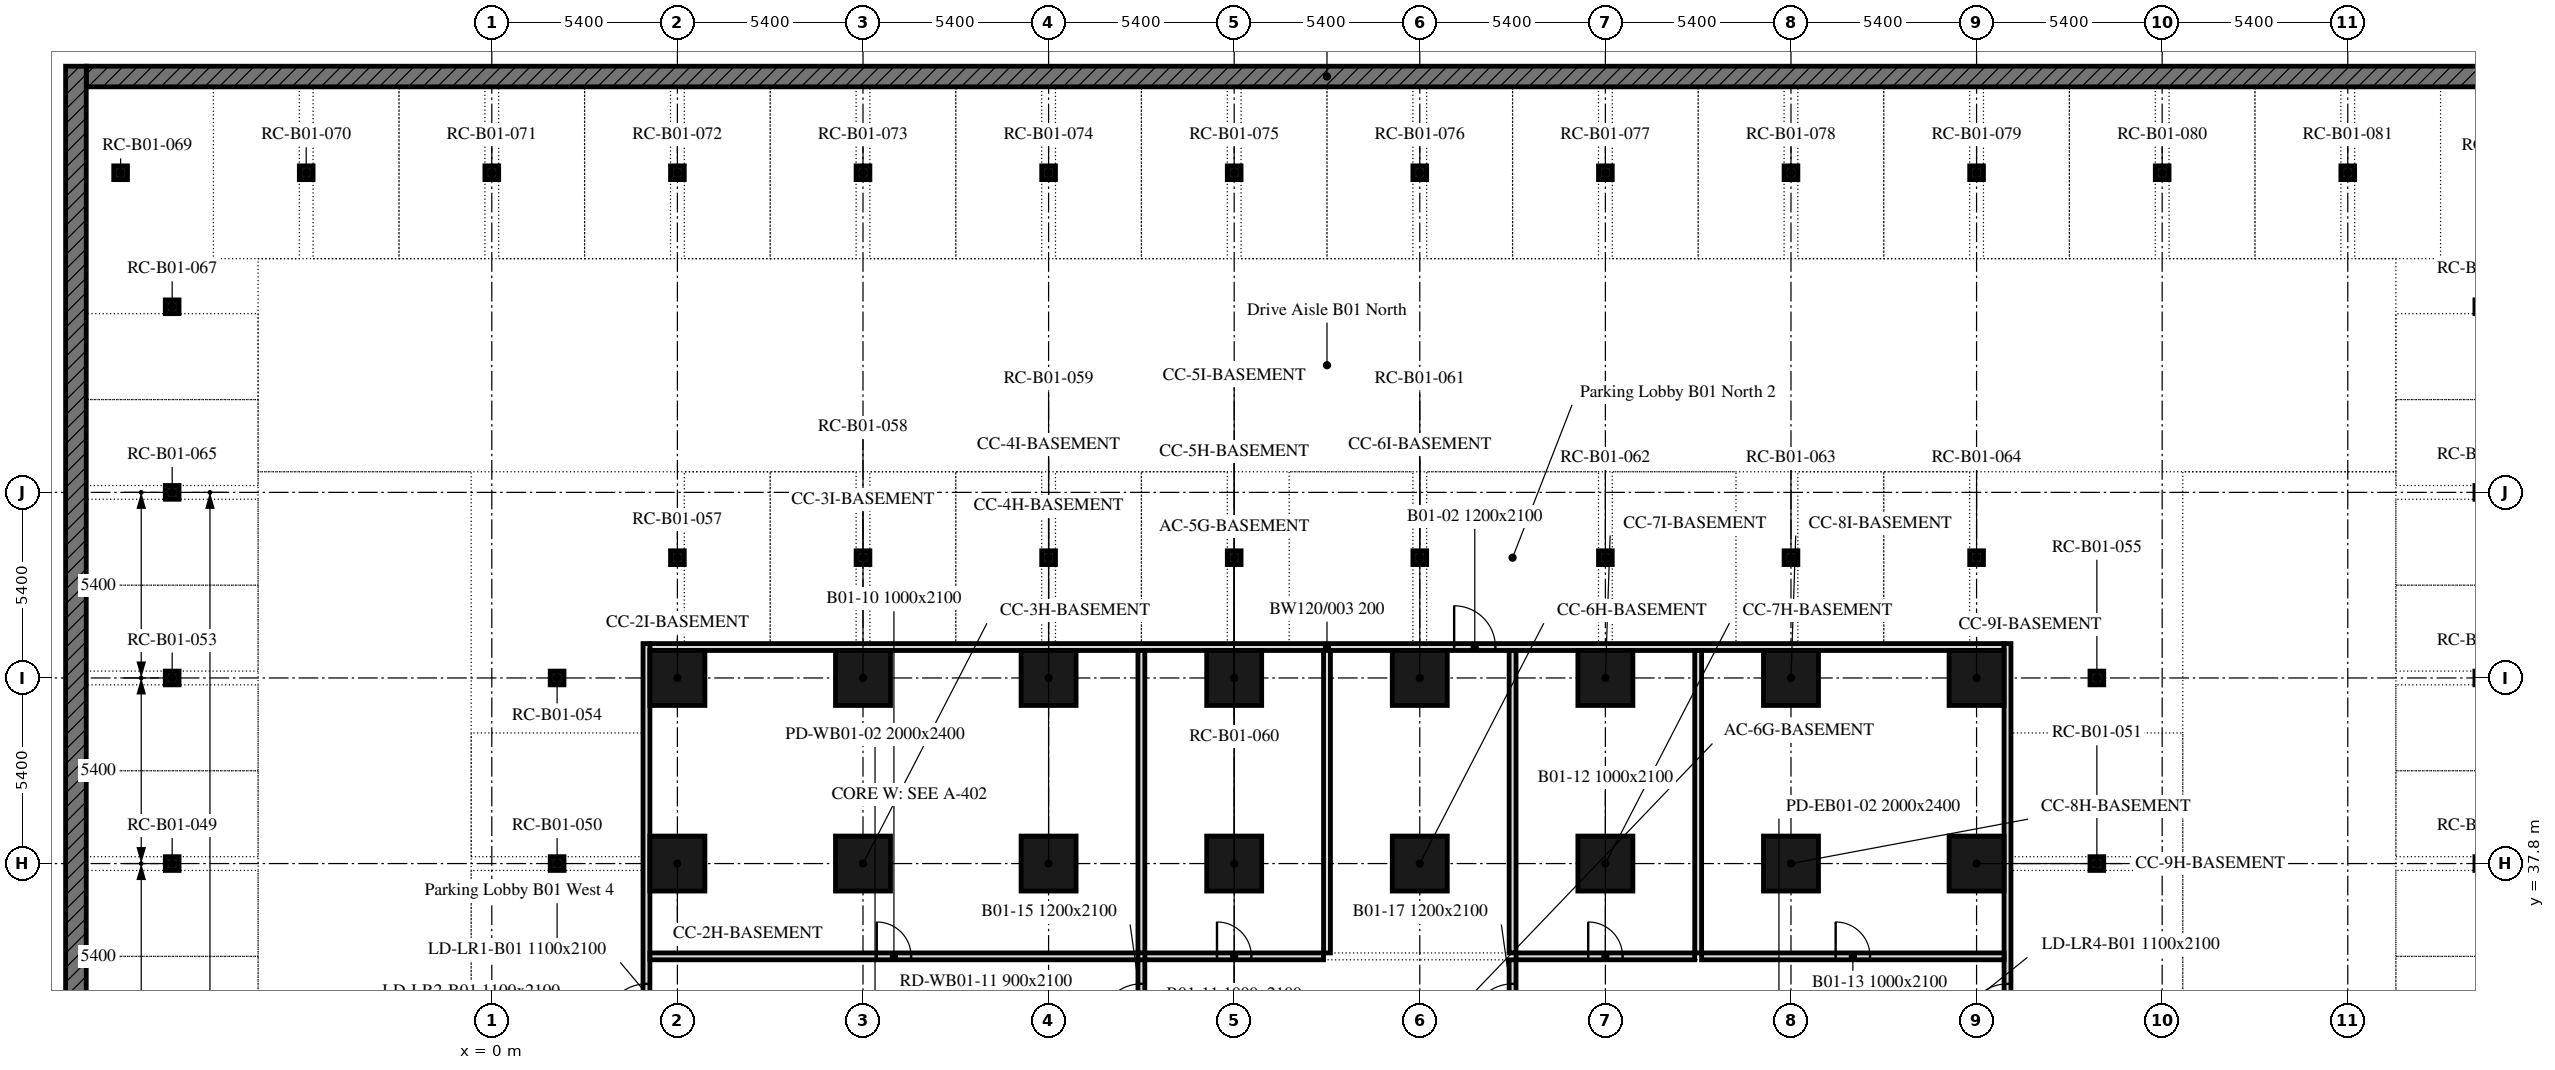
"""IFC4 building model, lengths in metres.
Left out: names, types, materials, properties, quantities, classifications, styles, units other than length and angle.
Written with IfcOpenShell. Run it as: python <this file> out.ifc"""

import sys

from ifc_helpers import new_model, si_unit, direction, frame, frame_2d, origin, origin_2d, place, context, subcontext, project, spatial, rectangle, extrude, element, fill, save


model = new_model("IFC4")
c1 = context("Model", 3, precision=1e-05, world=origin(), true_north=direction((0.0, 1.0)))
c2 = subcontext(c1, "Body", "Model", "MODEL_VIEW")
j1 = project(units=[si_unit("LENGTHUNIT", "METRE"), si_unit("PLANEANGLEUNIT", "RADIAN")], contexts=[c1])
p1 = place(None, origin())
s1 = spatial("IfcSite", under=j1, at=p1, CompositionType="ELEMENT")
p2 = place(p1, origin())
s2 = spatial("IfcBuilding", under=s1, at=p2, CompositionType="ELEMENT")
p3 = place(p2, frame((0.0, 0.0, -4.5)))
s3 = spatial("IfcBuildingStorey", under=s2, at=p3, CompositionType="ELEMENT", Elevation=-4.5)
p4 = place(p3, frame((-12.1, -12.4, 0.0), z_axis=(0.0, 0.0, 1.0), x_axis=(0.0, 1.0, 0.0)))
e1 = element("IfcWall", 1, at=p4, inside=s3, PredefinedType="SOLIDWALL", context=c2, shape_type="SweptSolid", body=[
    extrude(rectangle(XDim=73.4, YDim=0.6, at=frame_2d((36.7, 0.0))), origin(), (0.0, 0.0, 1.0), 4.0),
])
p5 = place(p3, frame((-11.8, 60.7, 0.0), z_axis=(0.0, 0.0, 1.0), x_axis=(1.0, 0.0, 0.0)))
e2 = element("IfcWall", 2, at=p5, inside=s3, PredefinedType="SOLIDWALL", context=c2, shape_type="SweptSolid", body=[
    extrude(rectangle(XDim=72.2, YDim=0.6, at=frame_2d((36.1, 0.0))), origin(), (0.0, 0.0, 1.0), 4.0),
])
for number, where, z_axis, x_axis in (
    (3, (5.4, 37.8, 0.0), (0.0, 0.0, 1.0), (1.0, 0.0, 0.0)),
    (4, (10.8, 37.8, 0.0), (0.0, 0.0, 1.0), (1.0, 0.0, 0.0)),
    (5, (16.2, 37.8, 0.0), (0.0, 0.0, 1.0), (1.0, 0.0, 0.0)),
    (6, (21.6, 37.8, 0.0), (0.0, 0.0, 1.0), (1.0, 0.0, 0.0)),
    (7, (27.0, 37.8, 0.0), (0.0, 0.0, 1.0), (1.0, 0.0, 0.0)),
    (8, (32.4, 37.8, 0.0), (0.0, 0.0, 1.0), (1.0, 0.0, 0.0)),
    (9, (37.8, 37.8, 0.0), (0.0, 0.0, 1.0), (1.0, 0.0, 0.0)),
    (10, (43.2, 37.8, 0.0), (0.0, 0.0, 1.0), (1.0, 0.0, 0.0)),
    (11, (5.4, 43.2, 0.0), (0.0, 0.0, 1.0), (1.0, 0.0, 0.0)),
    (12, (10.8, 43.2, 0.0), (0.0, 0.0, 1.0), (1.0, 0.0, 0.0)),
    (13, (16.2, 43.2, 0.0), (0.0, 0.0, 1.0), (1.0, 0.0, 0.0)),
    (14, (21.6, 43.2, 0.0), (0.0, 0.0, 1.0), (1.0, 0.0, 0.0)),
    (15, (27.0, 43.2, 0.0), (0.0, 0.0, 1.0), (1.0, 0.0, 0.0)),
    (16, (32.4, 43.2, 0.0), (0.0, 0.0, 1.0), (1.0, 0.0, 0.0)),
    (17, (37.8, 43.2, 0.0), (0.0, 0.0, 1.0), (1.0, 0.0, 0.0)),
    (18, (43.2, 43.2, 0.0), (0.0, 0.0, 1.0), (1.0, 0.0, 0.0)),
):
    element("IfcColumn", number, at=place(p3, frame(where, z_axis=z_axis, x_axis=x_axis)), inside=s3, PredefinedType="COLUMN", context=c2, shape_type="SweptSolid", body=[
        extrude(rectangle(XDim=1.6, YDim=1.6, at=origin_2d()), origin(), (0.0, 0.0, 1.0), 4.0),
    ])
for number, where, z_axis, x_axis in (
    (19, (-9.3, 37.8, 0.0), (0.0, 0.0, 1.0), (1.0, 0.0, 0.0)),
    (20, (1.9, 37.8, 0.0), (0.0, 0.0, 1.0), (1.0, 0.0, 0.0)),
    (21, (46.7, 37.8, 0.0), (0.0, 0.0, 1.0), (1.0, 0.0, 0.0)),
    (22, (-9.3, 43.2, 0.0), (0.0, 0.0, 1.0), (1.0, 0.0, 0.0)),
    (23, (1.9, 43.2, 0.0), (0.0, 0.0, 1.0), (1.0, 0.0, 0.0)),
    (24, (46.7, 43.2, 0.0), (0.0, 0.0, 1.0), (1.0, 0.0, 0.0)),
    (25, (5.4, 46.7, 0.0), (0.0, 0.0, 1.0), (1.0, 0.0, 0.0)),
    (26, (10.8, 46.7, 0.0), (0.0, 0.0, 1.0), (1.0, 0.0, 0.0)),
    (27, (16.2, 46.7, 0.0), (0.0, 0.0, 1.0), (1.0, 0.0, 0.0)),
    (28, (21.6, 46.7, 0.0), (0.0, 0.0, 1.0), (1.0, 0.0, 0.0)),
    (29, (27.0, 46.7, 0.0), (0.0, 0.0, 1.0), (1.0, 0.0, 0.0)),
    (30, (32.4, 46.7, 0.0), (0.0, 0.0, 1.0), (1.0, 0.0, 0.0)),
    (31, (37.8, 46.7, 0.0), (0.0, 0.0, 1.0), (1.0, 0.0, 0.0)),
    (32, (43.2, 46.7, 0.0), (0.0, 0.0, 1.0), (1.0, 0.0, 0.0)),
    (33, (-9.3, 48.6, 0.0), (0.0, 0.0, 1.0), (1.0, 0.0, 0.0)),
    (34, (-9.3, 54.0, 0.0), (0.0, 0.0, 1.0), (1.0, 0.0, 0.0)),
    (35, (-10.8, 57.9, 0.0), (0.0, 0.0, 1.0), (1.0, 0.0, 0.0)),
    (36, (-5.4, 57.9, 0.0), (0.0, 0.0, 1.0), (1.0, 0.0, 0.0)),
    (37, (0.0, 57.9, 0.0), (0.0, 0.0, 1.0), (1.0, 0.0, 0.0)),
    (38, (5.4, 57.9, 0.0), (0.0, 0.0, 1.0), (1.0, 0.0, 0.0)),
    (39, (10.8, 57.9, 0.0), (0.0, 0.0, 1.0), (1.0, 0.0, 0.0)),
    (40, (16.2, 57.9, 0.0), (0.0, 0.0, 1.0), (1.0, 0.0, 0.0)),
    (41, (21.6, 57.9, 0.0), (0.0, 0.0, 1.0), (1.0, 0.0, 0.0)),
    (42, (27.0, 57.9, 0.0), (0.0, 0.0, 1.0), (1.0, 0.0, 0.0)),
    (43, (32.4, 57.9, 0.0), (0.0, 0.0, 1.0), (1.0, 0.0, 0.0)),
    (44, (37.8, 57.9, 0.0), (0.0, 0.0, 1.0), (1.0, 0.0, 0.0)),
    (45, (43.2, 57.9, 0.0), (0.0, 0.0, 1.0), (1.0, 0.0, 0.0)),
    (46, (48.6, 57.9, 0.0), (0.0, 0.0, 1.0), (1.0, 0.0, 0.0)),
    (47, (54.0, 57.9, 0.0), (0.0, 0.0, 1.0), (1.0, 0.0, 0.0)),
):
    element("IfcColumn", number, at=place(p3, frame(where, z_axis=z_axis, x_axis=x_axis)), inside=s3, PredefinedType="COLUMN", context=c2, shape_type="SweptSolid", body=[
        extrude(rectangle(XDim=0.4, YDim=0.4, at=origin_2d()), origin(), (0.0, 0.0, 1.0), 4.0),
    ])
p6 = place(p3, frame((4.6, 44.1, 0.0), z_axis=(0.0, 0.0, 1.0), x_axis=(1.0, 0.0, 0.0)))
e48 = element("IfcWall", 48, at=p6, inside=s3, PredefinedType="PARTITIONING", context=c2, shape_type="SweptSolid", body=[
    extrude(rectangle(XDim=39.4, YDim=0.2, at=frame_2d((19.7, 0.0))), origin(), (0.0, 0.0, 1.0), 4.0),
])
p7 = place(p6, frame((23.4, 0.0, 0.0)))
e49 = element("IfcOpeningElement", 49, at=p7, cuts=e48, PredefinedType="OPENING", context=c2, shape_type="SweptSolid", body=[
    extrude(rectangle(XDim=1.2, YDim=2.1, at=frame_2d((0.6, 1.05))), frame((0.0, 0.11, 0.0), z_axis=(0.0, -1.0, 0.0), x_axis=(1.0, 0.0, 0.0)), (0.0, 0.0, 1.0), 0.22),
])
p8 = place(p3, frame((4.5, 4.4, 0.0), z_axis=(0.0, 0.0, 1.0), x_axis=(0.0, 1.0, 0.0)))
e50 = element("IfcWall", 50, at=p8, inside=s3, PredefinedType="PARTITIONING", context=c2, shape_type="SweptSolid", body=[
    extrude(rectangle(XDim=39.8, YDim=0.2, at=frame_2d((19.9, 0.0))), origin(), (0.0, 0.0, 1.0), 4.0),
])
p9 = place(p8, frame((9.9, 0.0, 0.0)))
e51 = element("IfcOpeningElement", 51, at=p9, cuts=e50, PredefinedType="OPENING", context=c2, shape_type="SweptSolid", body=[
    extrude(rectangle(XDim=1.2, YDim=2.1, at=frame_2d((0.6, 1.05))), frame((0.0, 0.11, 0.0), z_axis=(0.0, -1.0, 0.0), x_axis=(1.0, 0.0, 0.0)), (0.0, 0.0, 1.0), 0.22),
])
p10 = place(p8, frame((28.7, 0.0, 0.0)))
e52 = element("IfcOpeningElement", 52, at=p10, cuts=e50, PredefinedType="OPENING", context=c2, shape_type="SweptSolid", body=[
    extrude(rectangle(XDim=1.2, YDim=2.1, at=frame_2d((0.6, 1.05))), frame((0.0, 0.11, 0.0), z_axis=(0.0, -1.0, 0.0), x_axis=(1.0, 0.0, 0.0)), (0.0, 0.0, 1.0), 0.22),
])
p11 = place(p3, frame((44.1, 4.4, 0.0), z_axis=(0.0, 0.0, 1.0), x_axis=(0.0, 1.0, 0.0)))
e53 = element("IfcWall", 53, at=p11, inside=s3, PredefinedType="PARTITIONING", context=c2, shape_type="SweptSolid", body=[
    extrude(rectangle(XDim=39.8, YDim=0.2, at=frame_2d((19.9, 0.0))), origin(), (0.0, 0.0, 1.0), 4.0),
])
p12 = place(p11, frame((9.9, 0.0, 0.0)))
e54 = element("IfcOpeningElement", 54, at=p12, cuts=e53, PredefinedType="OPENING", context=c2, shape_type="SweptSolid", body=[
    extrude(rectangle(XDim=1.2, YDim=2.1, at=frame_2d((0.6, 1.05))), frame((0.0, 0.11, 0.0), z_axis=(0.0, -1.0, 0.0), x_axis=(1.0, 0.0, 0.0)), (0.0, 0.0, 1.0), 0.22),
])
p13 = place(p11, frame((28.7, 0.0, 0.0)))
e55 = element("IfcOpeningElement", 55, at=p13, cuts=e53, PredefinedType="OPENING", context=c2, shape_type="SweptSolid", body=[
    extrude(rectangle(XDim=1.2, YDim=2.1, at=frame_2d((0.6, 1.05))), frame((0.0, 0.11, 0.0), z_axis=(0.0, -1.0, 0.0), x_axis=(1.0, 0.0, 0.0)), (0.0, 0.0, 1.0), 0.22),
])
for number, where, z_axis, x_axis in (
    (56, (18.9, 35.2, 0.0), (0.0, 0.0, 1.0), (0.0, 1.0, 0.0)),
    (57, (24.3, 35.2, 0.0), (0.0, 0.0, 1.0), (0.0, 1.0, 0.0)),
    (58, (29.7, 35.2, 0.0), (0.0, 0.0, 1.0), (0.0, 1.0, 0.0)),
    (59, (35.1, 35.2, 0.0), (0.0, 0.0, 1.0), (0.0, 1.0, 0.0)),
):
    element("IfcWall", number, at=place(p3, frame(where, z_axis=z_axis, x_axis=x_axis)), inside=s3, PredefinedType="PARTITIONING", context=c2, shape_type="SweptSolid", body=[
        extrude(rectangle(XDim=8.8, YDim=0.2, at=frame_2d((4.4, 0.0))), origin(), (0.0, 0.0, 1.0), 4.0),
    ])
p14 = place(p3, frame((4.6, 35.1, 0.0), z_axis=(0.0, 0.0, 1.0), x_axis=(1.0, 0.0, 0.0)))
e60 = element("IfcWall", 60, at=p14, inside=s3, PredefinedType="PARTITIONING", context=c2, shape_type="SweptSolid", body=[
    extrude(rectangle(XDim=14.2, YDim=0.2, at=frame_2d((7.1, 0.0))), origin(), (0.0, 0.0, 1.0), 4.0),
])
p15 = place(p14, frame((6.6, 0.0, 0.0)))
e61 = element("IfcOpeningElement", 61, at=p15, cuts=e60, PredefinedType="OPENING", context=c2, shape_type="SweptSolid", body=[
    extrude(rectangle(XDim=1.0, YDim=2.1, at=frame_2d((0.5, 1.05))), frame((0.0, 0.11, 0.0), z_axis=(0.0, -1.0, 0.0), x_axis=(1.0, 0.0, 0.0)), (0.0, 0.0, 1.0), 0.22),
])
p16 = place(p3, frame((19.0, 35.1, 0.0), z_axis=(0.0, 0.0, 1.0), x_axis=(1.0, 0.0, 0.0)))
e62 = element("IfcWall", 62, at=p16, inside=s3, PredefinedType="PARTITIONING", context=c2, shape_type="SweptSolid", body=[
    extrude(rectangle(XDim=5.2, YDim=0.2, at=frame_2d((2.6, 0.0))), origin(), (0.0, 0.0, 1.0), 4.0),
])
p17 = place(p16, frame((2.1, 0.0, 0.0)))
e63 = element("IfcOpeningElement", 63, at=p17, cuts=e62, PredefinedType="OPENING", context=c2, shape_type="SweptSolid", body=[
    extrude(rectangle(XDim=1.0, YDim=2.1, at=frame_2d((0.5, 1.05))), frame((0.0, 0.11, 0.0), z_axis=(0.0, -1.0, 0.0), x_axis=(1.0, 0.0, 0.0)), (0.0, 0.0, 1.0), 0.22),
])
p18 = place(p3, frame((29.8, 35.1, 0.0), z_axis=(0.0, 0.0, 1.0), x_axis=(1.0, 0.0, 0.0)))
e64 = element("IfcWall", 64, at=p18, inside=s3, PredefinedType="PARTITIONING", context=c2, shape_type="SweptSolid", body=[
    extrude(rectangle(XDim=5.2, YDim=0.2, at=frame_2d((2.6, 0.0))), origin(), (0.0, 0.0, 1.0), 4.0),
])
p19 = place(p18, frame((2.1, 0.0, 0.0)))
e65 = element("IfcOpeningElement", 65, at=p19, cuts=e64, PredefinedType="OPENING", context=c2, shape_type="SweptSolid", body=[
    extrude(rectangle(XDim=1.0, YDim=2.1, at=frame_2d((0.5, 1.05))), frame((0.0, 0.11, 0.0), z_axis=(0.0, -1.0, 0.0), x_axis=(1.0, 0.0, 0.0)), (0.0, 0.0, 1.0), 0.22),
])
p20 = place(p3, frame((35.2, 35.1, 0.0), z_axis=(0.0, 0.0, 1.0), x_axis=(1.0, 0.0, 0.0)))
e66 = element("IfcWall", 66, at=p20, inside=s3, PredefinedType="PARTITIONING", context=c2, shape_type="SweptSolid", body=[
    extrude(rectangle(XDim=8.8, YDim=0.2, at=frame_2d((4.4, 0.0))), origin(), (0.0, 0.0, 1.0), 4.0),
])
p21 = place(p20, frame((3.9, 0.0, 0.0)))
e67 = element("IfcOpeningElement", 67, at=p21, cuts=e66, PredefinedType="OPENING", context=c2, shape_type="SweptSolid", body=[
    extrude(rectangle(XDim=1.0, YDim=2.1, at=frame_2d((0.5, 1.05))), frame((0.0, 0.11, 0.0), z_axis=(0.0, -1.0, 0.0), x_axis=(1.0, 0.0, 0.0)), (0.0, 0.0, 1.0), 0.22),
])
p22 = place(p3, frame((18.9, 32.4, 0.0), z_axis=(0.0, 0.0, 1.0), x_axis=(0.0, 1.0, 0.0)))
e68 = element("IfcWall", 68, at=p22, inside=s3, PredefinedType="PARTITIONING", context=c2, shape_type="SweptSolid", body=[
    extrude(rectangle(XDim=2.6, YDim=0.2, at=frame_2d((1.3, 0.0))), origin(), (0.0, 0.0, 1.0), 4.0),
])
p23 = place(p22, frame((0.7, 0.0, 0.0)))
e69 = element("IfcOpeningElement", 69, at=p23, cuts=e68, PredefinedType="OPENING", context=c2, shape_type="SweptSolid", body=[
    extrude(rectangle(XDim=1.2, YDim=2.1, at=frame_2d((0.6, 1.05))), frame((0.0, 0.11, 0.0), z_axis=(0.0, -1.0, 0.0), x_axis=(1.0, 0.0, 0.0)), (0.0, 0.0, 1.0), 0.22),
])
p24 = place(p3, frame((29.7, 32.4, 0.0), z_axis=(0.0, 0.0, 1.0), x_axis=(0.0, 1.0, 0.0)))
e70 = element("IfcWall", 70, at=p24, inside=s3, PredefinedType="PARTITIONING", context=c2, shape_type="SweptSolid", body=[
    extrude(rectangle(XDim=2.6, YDim=0.2, at=frame_2d((1.3, 0.0))), origin(), (0.0, 0.0, 1.0), 4.0),
])
p25 = place(p24, frame((0.7, 0.0, 0.0)))
e71 = element("IfcOpeningElement", 71, at=p25, cuts=e70, PredefinedType="OPENING", context=c2, shape_type="SweptSolid", body=[
    extrude(rectangle(XDim=1.2, YDim=2.1, at=frame_2d((0.6, 1.05))), frame((0.0, 0.11, 0.0), z_axis=(0.0, -1.0, 0.0), x_axis=(1.0, 0.0, 0.0)), (0.0, 0.0, 1.0), 0.22),
])
p26 = place(p7, origin())
e72 = element("IfcDoor", 72, at=p26, inside=s3, OperationType="SINGLE_SWING_LEFT", PredefinedType="DOOR", context=c2, shape_type="SweptSolid", body=[
    extrude(rectangle(XDim=1.2, YDim=2.1, at=frame_2d((0.6, 1.05))), frame((0.0, 0.025, 0.0), z_axis=(0.0, -1.0, 0.0), x_axis=(1.0, 0.0, 0.0)), (0.0, 0.0, 1.0), 0.05),
])
fill(e49, e72)
p27 = place(p10, origin())
e73 = element("IfcDoor", 73, at=p27, inside=s3, OperationType="SINGLE_SWING_LEFT", PredefinedType="DOOR", context=c2, shape_type="SweptSolid", body=[
    extrude(rectangle(XDim=1.2, YDim=2.1, at=frame_2d((0.6, 1.05))), frame((0.0, 0.025, 0.0), z_axis=(0.0, -1.0, 0.0), x_axis=(1.0, 0.0, 0.0)), (0.0, 0.0, 1.0), 0.05),
])
fill(e52, e73)
p28 = place(p13, origin())
e74 = element("IfcDoor", 74, at=p28, inside=s3, OperationType="SINGLE_SWING_LEFT", PredefinedType="DOOR", context=c2, shape_type="SweptSolid", body=[
    extrude(rectangle(XDim=1.2, YDim=2.1, at=frame_2d((0.6, 1.05))), frame((0.0, 0.025, 0.0), z_axis=(0.0, -1.0, 0.0), x_axis=(1.0, 0.0, 0.0)), (0.0, 0.0, 1.0), 0.05),
])
fill(e55, e74)
p29 = place(p15, origin())
e75 = element("IfcDoor", 75, at=p29, inside=s3, OperationType="SINGLE_SWING_LEFT", PredefinedType="DOOR", context=c2, shape_type="SweptSolid", body=[
    extrude(rectangle(XDim=1.0, YDim=2.1, at=frame_2d((0.5, 1.05))), frame((0.0, 0.025, 0.0), z_axis=(0.0, -1.0, 0.0), x_axis=(1.0, 0.0, 0.0)), (0.0, 0.0, 1.0), 0.05),
])
fill(e61, e75)
p30 = place(p17, origin())
e76 = element("IfcDoor", 76, at=p30, inside=s3, OperationType="SINGLE_SWING_LEFT", PredefinedType="DOOR", context=c2, shape_type="SweptSolid", body=[
    extrude(rectangle(XDim=1.0, YDim=2.1, at=frame_2d((0.5, 1.05))), frame((0.0, 0.025, 0.0), z_axis=(0.0, -1.0, 0.0), x_axis=(1.0, 0.0, 0.0)), (0.0, 0.0, 1.0), 0.05),
])
fill(e63, e76)
p31 = place(p19, origin())
e77 = element("IfcDoor", 77, at=p31, inside=s3, OperationType="SINGLE_SWING_LEFT", PredefinedType="DOOR", context=c2, shape_type="SweptSolid", body=[
    extrude(rectangle(XDim=1.0, YDim=2.1, at=frame_2d((0.5, 1.05))), frame((0.0, 0.025, 0.0), z_axis=(0.0, -1.0, 0.0), x_axis=(1.0, 0.0, 0.0)), (0.0, 0.0, 1.0), 0.05),
])
fill(e65, e77)
p32 = place(p21, origin())
e78 = element("IfcDoor", 78, at=p32, inside=s3, OperationType="SINGLE_SWING_LEFT", PredefinedType="DOOR", context=c2, shape_type="SweptSolid", body=[
    extrude(rectangle(XDim=1.0, YDim=2.1, at=frame_2d((0.5, 1.05))), frame((0.0, 0.025, 0.0), z_axis=(0.0, -1.0, 0.0), x_axis=(1.0, 0.0, 0.0)), (0.0, 0.0, 1.0), 0.05),
])
fill(e67, e78)
p33 = place(p23, origin())
e79 = element("IfcDoor", 79, at=p33, inside=s3, OperationType="SINGLE_SWING_LEFT", PredefinedType="DOOR", context=c2, shape_type="SweptSolid", body=[
    extrude(rectangle(XDim=1.2, YDim=2.1, at=frame_2d((0.6, 1.05))), frame((0.0, 0.025, 0.0), z_axis=(0.0, -1.0, 0.0), x_axis=(1.0, 0.0, 0.0)), (0.0, 0.0, 1.0), 0.05),
])
fill(e69, e79)
p34 = place(p25, origin())
e80 = element("IfcDoor", 80, at=p34, inside=s3, OperationType="SINGLE_SWING_LEFT", PredefinedType="DOOR", context=c2, shape_type="SweptSolid", body=[
    extrude(rectangle(XDim=1.2, YDim=2.1, at=frame_2d((0.6, 1.05))), frame((0.0, 0.025, 0.0), z_axis=(0.0, -1.0, 0.0), x_axis=(1.0, 0.0, 0.0)), (0.0, 0.0, 1.0), 0.05),
])
fill(e71, e80)
save(model, sys.argv[1])
